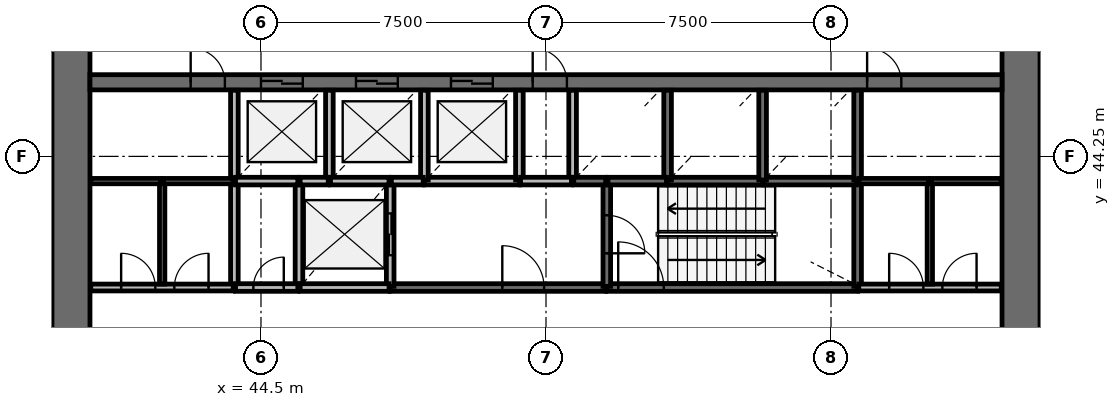
"""IFC4 building model, lengths in metres.
Left out: names, types, materials, properties, quantities, classifications, styles, units other than length and angle.
Written with IfcOpenShell. Run it as: python <this file> out.ifc"""

import sys

from ifc_helpers import new_model, si_unit, direction, frame, frame_2d, origin, place, context, subcontext, project, spatial, rectangle, extrude, source, transform, mapped, element, fill, save


model = new_model("IFC4")
c1 = context("Model", 3, precision=1e-05, world=origin(), true_north=direction((0.0, 1.0)))
c2 = subcontext(c1, "Body", "Model", "MODEL_VIEW")
j1 = project(units=[si_unit("LENGTHUNIT", "METRE"), si_unit("PLANEANGLEUNIT", "RADIAN")], contexts=[c1])
p1 = place(None, origin())
s1 = spatial("IfcSite", under=j1, at=p1, CompositionType="ELEMENT")
p2 = place(p1, origin())
s2 = spatial("IfcBuilding", under=s1, at=p2, CompositionType="ELEMENT")
p3 = place(p2, frame((0.0, 0.0, 35.8)))
s3 = spatial("IfcBuildingStorey", under=s2, at=p3, CompositionType="ELEMENT", Elevation=35.8)
p4 = place(p3, frame((64.5, 38.0, 0.0), z_axis=(0.0, 0.0, 1.0), x_axis=(0.0, 1.0, 0.0)))
e1 = element("IfcWall", 1, at=p4, inside=s3, PredefinedType="SHEAR", context=c2, shape_type="SweptSolid", body=[
    extrude(rectangle(XDim=20.0, YDim=1.0, at=frame_2d((10.0, 0.0))), origin(), (0.0, 0.0, 1.0), 4.4),
])
p5 = place(p4, frame((9.1, 0.0, 0.0)))
e2 = element("IfcOpeningElement", 2, at=p5, cuts=e1, PredefinedType="OPENING", context=c2, shape_type="SweptSolid", body=[
    extrude(rectangle(XDim=1.8, YDim=2.1, at=frame_2d((0.9, 1.05))), frame((0.0, 0.51, 0.0), z_axis=(0.0, -1.0, 0.0), x_axis=(1.0, 0.0, 0.0)), (0.0, 0.0, 1.0), 1.02),
])
p6 = place(p3, frame((39.5, 58.0, 0.0), z_axis=(0.0, 0.0, 1.0), x_axis=(0.0, -1.0, 0.0)))
e3 = element("IfcWall", 3, at=p6, inside=s3, PredefinedType="SHEAR", context=c2, shape_type="SweptSolid", body=[
    extrude(rectangle(XDim=20.0, YDim=1.0, at=frame_2d((10.0, 0.0))), origin(), (0.0, 0.0, 1.0), 4.4),
])
p7 = place(p6, frame((9.1, 0.0, 0.0)))
e4 = element("IfcOpeningElement", 4, at=p7, cuts=e3, PredefinedType="OPENING", context=c2, shape_type="SweptSolid", body=[
    extrude(rectangle(XDim=1.8, YDim=2.1, at=frame_2d((0.9, 1.05))), frame((0.0, 0.51, 0.0), z_axis=(0.0, -1.0, 0.0), x_axis=(1.0, 0.0, 0.0)), (0.0, 0.0, 1.0), 1.02),
])
p8 = place(p3, frame((40.0, 46.2, 0.0), z_axis=(0.0, 0.0, 1.0), x_axis=(1.0, 0.0, 0.0)))
e5 = element("IfcWall", 5, at=p8, inside=s3, PredefinedType="SHEAR", context=c2, shape_type="SweptSolid", body=[
    extrude(rectangle(XDim=24.0, YDim=0.4, at=frame_2d((12.0, 0.0))), origin(), (0.0, 0.0, 1.0), 4.4),
])
p9 = place(p8, frame((4.5, 0.0, 0.0)))
e6 = element("IfcOpeningElement", 6, at=p9, cuts=e5, PredefinedType="OPENING", context=c2, shape_type="SweptSolid", body=[
    extrude(rectangle(XDim=1.1, YDim=2.1, at=frame_2d((0.55, 1.05))), frame((0.0, 0.21, 0.0), z_axis=(0.0, -1.0, 0.0), x_axis=(1.0, 0.0, 0.0)), (0.0, 0.0, 1.0), 0.42),
])
p10 = place(p8, frame((7.0, 0.0, 0.0)))
e7 = element("IfcOpeningElement", 7, at=p10, cuts=e5, PredefinedType="OPENING", context=c2, shape_type="SweptSolid", body=[
    extrude(rectangle(XDim=1.1, YDim=2.1, at=frame_2d((0.55, 1.05))), frame((0.0, 0.21, 0.0), z_axis=(0.0, -1.0, 0.0), x_axis=(1.0, 0.0, 0.0)), (0.0, 0.0, 1.0), 0.42),
])
p11 = place(p8, frame((9.5, 0.0, 0.0)))
e8 = element("IfcOpeningElement", 8, at=p11, cuts=e5, PredefinedType="OPENING", context=c2, shape_type="SweptSolid", body=[
    extrude(rectangle(XDim=1.1, YDim=2.1, at=frame_2d((0.55, 1.05))), frame((0.0, 0.21, 0.0), z_axis=(0.0, -1.0, 0.0), x_axis=(1.0, 0.0, 0.0)), (0.0, 0.0, 1.0), 0.42),
])
p12 = place(p8, frame((20.45, 0.0, 0.0)))
e9 = element("IfcOpeningElement", 9, at=p12, cuts=e5, PredefinedType="OPENING", context=c2, shape_type="SweptSolid", body=[
    extrude(rectangle(XDim=0.9, YDim=2.1, at=frame_2d((0.45, 1.05))), frame((0.0, 0.21, 0.0), z_axis=(0.0, -1.0, 0.0), x_axis=(1.0, 0.0, 0.0)), (0.0, 0.0, 1.0), 0.42),
])
p13 = place(p8, frame((2.65, 0.0, 0.0)))
e10 = element("IfcOpeningElement", 10, at=p13, cuts=e5, PredefinedType="OPENING", context=c2, shape_type="SweptSolid", body=[
    extrude(rectangle(XDim=0.9, YDim=2.1, at=frame_2d((0.45, 1.05))), frame((0.0, 0.21, 0.0), z_axis=(0.0, -1.0, 0.0), x_axis=(1.0, 0.0, 0.0)), (0.0, 0.0, 1.0), 0.42),
])
p14 = place(p8, frame((11.65, 0.0, 0.0)))
e11 = element("IfcOpeningElement", 11, at=p14, cuts=e5, PredefinedType="OPENING", context=c2, shape_type="SweptSolid", body=[
    extrude(rectangle(XDim=0.9, YDim=2.1, at=frame_2d((0.45, 1.05))), frame((0.0, 0.21, 0.0), z_axis=(0.0, -1.0, 0.0), x_axis=(1.0, 0.0, 0.0)), (0.0, 0.0, 1.0), 0.42),
])
p15 = place(p3, frame((53.6, 40.8, 0.0), z_axis=(0.0, 0.0, 1.0), x_axis=(1.0, 0.0, 0.0)))
e12 = element("IfcWall", 12, at=p15, inside=s3, PredefinedType="SOLIDWALL", context=c2, shape_type="SweptSolid", body=[
    extrude(rectangle(XDim=6.6, YDim=0.2, at=frame_2d((3.3, 0.0))), origin(), (0.0, 0.0, 1.0), 3.95),
])
p16 = place(p15, frame((0.3, 0.0, 0.0)))
e13 = element("IfcOpeningElement", 13, at=p16, cuts=e12, PredefinedType="OPENING", context=c2, shape_type="SweptSolid", body=[
    extrude(rectangle(XDim=1.2, YDim=2.1, at=frame_2d((0.6, 1.05))), frame((0.0, 0.11, 0.0), z_axis=(0.0, -1.0, 0.0), x_axis=(1.0, 0.0, 0.0)), (0.0, 0.0, 1.0), 0.22),
])
p17 = place(p3, frame((47.9, 40.8, 0.0), z_axis=(0.0, 0.0, 1.0), x_axis=(1.0, 0.0, 0.0)))
e14 = element("IfcWall", 14, at=p17, inside=s3, PredefinedType="SOLIDWALL", context=c2, shape_type="SweptSolid", body=[
    extrude(rectangle(XDim=5.67, YDim=0.2, at=frame_2d((2.835, 0.0))), origin(), (0.0, 0.0, 1.0), 3.95),
])
p18 = place(p17, frame((2.95, 0.0, 0.0)))
e15 = element("IfcOpeningElement", 15, at=p18, cuts=e14, PredefinedType="OPENING", context=c2, shape_type="SweptSolid", body=[
    extrude(rectangle(XDim=1.1, YDim=2.1, at=frame_2d((0.55, 1.05))), frame((0.0, 0.11, 0.0), z_axis=(0.0, -1.0, 0.0), x_axis=(1.0, 0.0, 0.0)), (0.0, 0.0, 1.0), 0.22),
])
for number, where, z_axis, x_axis in (
    (16, (43.8, 43.6, 0.0), (0.0, 0.0, 1.0), (0.0, -1.0, 0.0)),
    (17, (45.5, 43.6, 0.0), (0.0, 0.0, 1.0), (0.0, -1.0, 0.0)),
):
    element("IfcWall", number, at=place(p3, frame(where, z_axis=z_axis, x_axis=x_axis)), inside=s3, PredefinedType="SOLIDWALL", context=c2, shape_type="SweptSolid", body=[
        extrude(rectangle(XDim=2.8, YDim=0.2, at=frame_2d((1.4, 0.0))), origin(), (0.0, 0.0, 1.0), 3.95),
    ])
p19 = place(p3, frame((47.9, 40.83, 0.0), z_axis=(0.0, 0.0, 1.0), x_axis=(0.0, 1.0, 0.0)))
e18 = element("IfcWall", 18, at=p19, inside=s3, PredefinedType="SOLIDWALL", context=c2, shape_type="SweptSolid", body=[
    extrude(rectangle(XDim=2.77, YDim=0.2, at=frame_2d((1.385, 0.0))), origin(), (0.0, 0.0, 1.0), 3.95),
])
p20 = place(p19, frame((0.82, 0.0, 0.0)))
e19 = element("IfcOpeningElement", 19, at=p20, cuts=e18, PredefinedType="OPENING", context=c2, shape_type="SweptSolid", body=[
    extrude(rectangle(XDim=1.1, YDim=2.1, at=frame_2d((0.55, 1.05))), frame((0.0, 0.11, 0.0), z_axis=(0.0, -1.0, 0.0), x_axis=(1.0, 0.0, 0.0)), (0.0, 0.0, 1.0), 0.22),
])
p21 = place(p3, frame((60.2, 40.83, 0.0), z_axis=(0.0, 0.0, 1.0), x_axis=(0.0, 1.0, 0.0)))
e20 = element("IfcWall", 20, at=p21, inside=s3, PredefinedType="SOLIDWALL", context=c2, shape_type="SweptSolid", body=[
    extrude(rectangle(XDim=2.77, YDim=0.2, at=frame_2d((1.385, 0.0))), origin(), (0.0, 0.0, 1.0), 3.95),
])
p22 = place(p3, frame((53.6, 43.6, 0.0), z_axis=(0.0, 0.0, 1.0), x_axis=(0.0, -1.0, 0.0)))
e21 = element("IfcWall", 21, at=p22, inside=s3, PredefinedType="SOLIDWALL", context=c2, shape_type="SweptSolid", body=[
    extrude(rectangle(XDim=2.77, YDim=0.2, at=frame_2d((1.385, 0.0))), origin(), (0.0, 0.0, 1.0), 3.95),
])
p23 = place(p22, frame((0.9, 0.0, 0.0)))
e22 = element("IfcOpeningElement", 22, at=p23, cuts=e21, PredefinedType="OPENING", context=c2, shape_type="SweptSolid", body=[
    extrude(rectangle(XDim=1.0, YDim=2.1, at=frame_2d((0.5, 1.05))), frame((0.0, 0.11, 0.0), z_axis=(0.0, -1.0, 0.0), x_axis=(1.0, 0.0, 0.0)), (0.0, 0.0, 1.0), 0.22),
])
for number, where, z_axis, x_axis in (
    (23, (48.8, 43.6, 0.0), (0.0, 0.0, 1.0), (1.0, 0.0, 0.0)),
    (24, (55.2, 43.6, 0.0), (0.0, 0.0, 1.0), (1.0, 0.0, 0.0)),
):
    element("IfcWall", number, at=place(p3, frame(where, z_axis=z_axis, x_axis=x_axis)), inside=s3, PredefinedType="SOLIDWALL", context=c2, shape_type="SweptSolid", body=[
        extrude(rectangle(XDim=2.5, YDim=0.2, at=frame_2d((1.25, 0.0))), origin(), (0.0, 0.0, 1.0), 3.95),
    ])
p24 = place(p3, frame((57.73, 43.6, 0.0), z_axis=(0.0, 0.0, 1.0), x_axis=(1.0, 0.0, 0.0)))
e25 = element("IfcWall", 25, at=p24, inside=s3, PredefinedType="SOLIDWALL", context=c2, shape_type="SweptSolid", body=[
    extrude(rectangle(XDim=2.44, YDim=0.2, at=frame_2d((1.22, 0.0))), origin(), (0.0, 0.0, 1.0), 3.95),
])
p25 = place(p3, frame((45.53, 40.8, 0.0), z_axis=(0.0, 0.0, 1.0), x_axis=(1.0, 0.0, 0.0)))
e26 = element("IfcWall", 26, at=p25, inside=s3, PredefinedType="SOLIDWALL", context=c2, shape_type="SweptSolid", body=[
    extrude(rectangle(XDim=2.34, YDim=0.2, at=frame_2d((1.17, 0.0))), origin(), (0.0, 0.0, 1.0), 3.95),
])
p26 = place(p3, frame((43.8, 45.99, 0.0), z_axis=(0.0, 0.0, 1.0), x_axis=(0.0, -1.0, 0.0)))
e27 = element("IfcWall", 27, at=p26, inside=s3, PredefinedType="SOLIDWALL", context=c2, shape_type="SweptSolid", body=[
    extrude(rectangle(XDim=2.36, YDim=0.2, at=frame_2d((1.18, 0.0))), origin(), (0.0, 0.0, 1.0), 3.95),
])
p27 = place(p3, frame((46.3, 43.6, 0.0), z_axis=(0.0, 0.0, 1.0), x_axis=(0.0, 1.0, 0.0)))
e28 = element("IfcWall", 28, at=p27, inside=s3, PredefinedType="SOLIDWALL", context=c2, shape_type="SweptSolid", body=[
    extrude(rectangle(XDim=2.39, YDim=0.2, at=frame_2d((1.195, 0.0))), origin(), (0.0, 0.0, 1.0), 3.95),
])
for number, where, z_axis, x_axis in (
    (29, (48.8, 43.63, 0.0), (0.0, 0.0, 1.0), (0.0, 1.0, 0.0)),
    (30, (51.3, 43.63, 0.0), (0.0, 0.0, 1.0), (0.0, 1.0, 0.0)),
):
    element("IfcWall", number, at=place(p3, frame(where, z_axis=z_axis, x_axis=x_axis)), inside=s3, PredefinedType="SOLIDWALL", context=c2, shape_type="SweptSolid", body=[
        extrude(rectangle(XDim=2.36, YDim=0.2, at=frame_2d((1.18, 0.0))), origin(), (0.0, 0.0, 1.0), 3.95),
    ])
p28 = place(p3, frame((52.7, 45.99, 0.0), z_axis=(0.0, 0.0, 1.0), x_axis=(0.0, -1.0, 0.0)))
e31 = element("IfcWall", 31, at=p28, inside=s3, PredefinedType="SOLIDWALL", context=c2, shape_type="SweptSolid", body=[
    extrude(rectangle(XDim=2.39, YDim=0.2, at=frame_2d((1.195, 0.0))), origin(), (0.0, 0.0, 1.0), 3.95),
])
for number, where, z_axis, x_axis in (
    (32, (55.2, 43.63, 0.0), (0.0, 0.0, 1.0), (0.0, 1.0, 0.0)),
    (33, (57.7, 43.63, 0.0), (0.0, 0.0, 1.0), (0.0, 1.0, 0.0)),
    (34, (60.2, 43.63, 0.0), (0.0, 0.0, 1.0), (0.0, 1.0, 0.0)),
):
    element("IfcWall", number, at=place(p3, frame(where, z_axis=z_axis, x_axis=x_axis)), inside=s3, PredefinedType="SOLIDWALL", context=c2, shape_type="SweptSolid", body=[
        extrude(rectangle(XDim=2.36, YDim=0.2, at=frame_2d((1.18, 0.0))), origin(), (0.0, 0.0, 1.0), 3.95),
    ])
p29 = place(p3, frame((43.83, 43.6, 0.0), z_axis=(0.0, 0.0, 1.0), x_axis=(1.0, 0.0, 0.0)))
e35 = element("IfcWall", 35, at=p29, inside=s3, PredefinedType="SOLIDWALL", context=c2, shape_type="SweptSolid", body=[
    extrude(rectangle(XDim=1.64, YDim=0.2, at=frame_2d((0.82, 0.0))), origin(), (0.0, 0.0, 1.0), 3.95),
])
p30 = place(p3, frame((43.83, 40.8, 0.0), z_axis=(0.0, 0.0, 1.0), x_axis=(1.0, 0.0, 0.0)))
e36 = element("IfcWall", 36, at=p30, inside=s3, PredefinedType="SOLIDWALL", context=c2, shape_type="SweptSolid", body=[
    extrude(rectangle(XDim=1.64, YDim=0.2, at=frame_2d((0.82, 0.0))), origin(), (0.0, 0.0, 1.0), 3.95),
])
p31 = place(p30, frame((0.47, 0.0, 0.0)))
e37 = element("IfcOpeningElement", 37, at=p31, cuts=e36, PredefinedType="OPENING", context=c2, shape_type="SweptSolid", body=[
    extrude(rectangle(XDim=0.8, YDim=2.1, at=frame_2d((0.4, 1.05))), frame((0.0, 0.11, 0.0), z_axis=(0.0, -1.0, 0.0), x_axis=(1.0, 0.0, 0.0)), (0.0, 0.0, 1.0), 0.22),
])
for number, where, z_axis, x_axis in (
    (38, (46.33, 43.6, 0.0), (0.0, 0.0, 1.0), (1.0, 0.0, 0.0)),
    (39, (53.63, 43.6, 0.0), (0.0, 0.0, 1.0), (1.0, 0.0, 0.0)),
):
    element("IfcWall", number, at=place(p3, frame(where, z_axis=z_axis, x_axis=x_axis)), inside=s3, PredefinedType="SOLIDWALL", context=c2, shape_type="SweptSolid", body=[
        extrude(rectangle(XDim=1.54, YDim=0.2, at=frame_2d((0.77, 0.0))), origin(), (0.0, 0.0, 1.0), 3.95),
    ])
p32 = place(p3, frame((52.67, 43.6, 0.0), z_axis=(0.0, 0.0, 1.0), x_axis=(-1.0, 0.0, 0.0)))
e40 = element("IfcWall", 40, at=p32, inside=s3, PredefinedType="SOLIDWALL", context=c2, shape_type="SweptSolid", body=[
    extrude(rectangle(XDim=1.34, YDim=0.2, at=frame_2d((0.67, 0.0))), origin(), (0.0, 0.0, 1.0), 3.95),
])
for number, where, z_axis, x_axis in (
    (41, (47.93, 43.6, 0.0), (0.0, 0.0, 1.0), (1.0, 0.0, 0.0)),
    (42, (52.73, 43.6, 0.0), (0.0, 0.0, 1.0), (1.0, 0.0, 0.0)),
):
    element("IfcWall", number, at=place(p3, frame(where, z_axis=z_axis, x_axis=x_axis)), inside=s3, PredefinedType="SOLIDWALL", context=c2, shape_type="SweptSolid", body=[
        extrude(rectangle(XDim=0.84, YDim=0.2, at=frame_2d((0.42, 0.0))), origin(), (0.0, 0.0, 1.0), 3.95),
    ])
p33 = place(p3, frame((45.53, 43.6, 0.0), z_axis=(0.0, 0.0, 1.0), x_axis=(1.0, 0.0, 0.0)))
e43 = element("IfcWall", 43, at=p33, inside=s3, PredefinedType="SOLIDWALL", context=c2, shape_type="SweptSolid", body=[
    extrude(rectangle(XDim=0.74, YDim=0.2, at=frame_2d((0.37, 0.0))), origin(), (0.0, 0.0, 1.0), 3.95),
])
p34 = place(p3, frame((40.02, 40.8, 0.0), z_axis=(0.0, 0.0, 1.0), x_axis=(1.0, 0.0, 0.0)))
e44 = element("IfcWall", 44, at=p34, inside=s3, PredefinedType="PARTITIONING", context=c2, shape_type="SweptSolid", body=[
    extrude(rectangle(XDim=3.75, YDim=0.18, at=frame_2d((1.875, 0.0))), origin(), (0.0, 0.0, 1.0), 3.95),
])
p35 = place(p34, frame((0.8, 0.0, 0.0)))
e45 = element("IfcOpeningElement", 45, at=p35, cuts=e44, PredefinedType="OPENING", context=c2, shape_type="SweptSolid", body=[
    extrude(rectangle(XDim=0.9, YDim=2.1, at=frame_2d((0.45, 1.05))), frame((0.0, 0.1, 0.0), z_axis=(0.0, -1.0, 0.0), x_axis=(1.0, 0.0, 0.0)), (0.0, 0.0, 1.0), 0.2),
])
p36 = place(p34, frame((2.2, 0.0, 0.0)))
e46 = element("IfcOpeningElement", 46, at=p36, cuts=e44, PredefinedType="OPENING", context=c2, shape_type="SweptSolid", body=[
    extrude(rectangle(XDim=0.9, YDim=2.1, at=frame_2d((0.45, 1.05))), frame((0.0, 0.1, 0.0), z_axis=(0.0, -1.0, 0.0), x_axis=(1.0, 0.0, 0.0)), (0.0, 0.0, 1.0), 0.2),
])
p37 = place(p3, frame((60.23, 40.8, 0.0), z_axis=(0.0, 0.0, 1.0), x_axis=(1.0, 0.0, 0.0)))
e47 = element("IfcWall", 47, at=p37, inside=s3, PredefinedType="PARTITIONING", context=c2, shape_type="SweptSolid", body=[
    extrude(rectangle(XDim=3.75, YDim=0.18, at=frame_2d((1.875, 0.0))), origin(), (0.0, 0.0, 1.0), 3.95),
])
p38 = place(p37, frame((0.8, 0.0, 0.0)))
e48 = element("IfcOpeningElement", 48, at=p38, cuts=e47, PredefinedType="OPENING", context=c2, shape_type="SweptSolid", body=[
    extrude(rectangle(XDim=0.9, YDim=2.1, at=frame_2d((0.45, 1.05))), frame((0.0, 0.1, 0.0), z_axis=(0.0, -1.0, 0.0), x_axis=(1.0, 0.0, 0.0)), (0.0, 0.0, 1.0), 0.2),
])
p39 = place(p37, frame((2.2, 0.0, 0.0)))
e49 = element("IfcOpeningElement", 49, at=p39, cuts=e47, PredefinedType="OPENING", context=c2, shape_type="SweptSolid", body=[
    extrude(rectangle(XDim=0.9, YDim=2.1, at=frame_2d((0.45, 1.05))), frame((0.0, 0.1, 0.0), z_axis=(0.0, -1.0, 0.0), x_axis=(1.0, 0.0, 0.0)), (0.0, 0.0, 1.0), 0.2),
])
for number, where, z_axis, x_axis in (
    (50, (41.9, 40.89, 0.0), (0.0, 0.0, 1.0), (0.0, 1.0, 0.0)),
    (51, (62.1, 40.89, 0.0), (0.0, 0.0, 1.0), (0.0, 1.0, 0.0)),
):
    element("IfcWall", number, at=place(p3, frame(where, z_axis=z_axis, x_axis=x_axis)), inside=s3, PredefinedType="PARTITIONING", context=c2, shape_type="SweptSolid", body=[
        extrude(rectangle(XDim=2.71, YDim=0.14, at=frame_2d((1.355, 0.0))), origin(), (0.0, 0.0, 1.0), 3.05),
    ])
for number, where, z_axis, x_axis in (
    (52, (43.77, 43.6, 0.0), (0.0, 0.0, 1.0), (-1.0, 0.0, 0.0)),
    (53, (60.23, 43.6, 0.0), (0.0, 0.0, 1.0), (1.0, 0.0, 0.0)),
):
    element("IfcWall", number, at=place(p3, frame(where, z_axis=z_axis, x_axis=x_axis)), inside=s3, PredefinedType="PARTITIONING", context=c2, shape_type="SweptSolid", body=[
        extrude(rectangle(XDim=1.84, YDim=0.14, at=frame_2d((0.92, 0.0))), origin(), (0.0, 0.0, 1.0), 3.05),
    ])
for number, where, z_axis, x_axis in (
    (54, (41.87, 43.6, 0.0), (0.0, 0.0, 1.0), (-1.0, 0.0, 0.0)),
    (55, (62.13, 43.6, 0.0), (0.0, 0.0, 1.0), (1.0, 0.0, 0.0)),
):
    element("IfcWall", number, at=place(p3, frame(where, z_axis=z_axis, x_axis=x_axis)), inside=s3, PredefinedType="PARTITIONING", context=c2, shape_type="SweptSolid", body=[
        extrude(rectangle(XDim=1.85, YDim=0.14, at=frame_2d((0.925, 0.0))), origin(), (0.0, 0.0, 1.0), 3.05),
    ])
m1 = source(origin(), c2, "Body", "SweptSolid", [
    extrude(rectangle(XDim=1.1, YDim=2.1, at=frame_2d((0.55, 1.05))), frame((0.0, 0.025, 0.0), z_axis=(0.0, -1.0, 0.0), x_axis=(1.0, 0.0, 0.0)), (0.0, 0.0, 1.0), 0.05),
])
p40 = place(p9, origin())
e56 = element("IfcDoor", 56, at=p40, inside=s3, OperationType="DOUBLE_DOOR_SLIDING", PredefinedType="USERDEFINED", context=c2, shape_type="MappedRepresentation", body=[
    mapped(m1, transform((0.0, 0.0, 0.0), scale=1.0)),
])
fill(e6, e56)
p41 = place(p10, origin())
e57 = element("IfcDoor", 57, at=p41, inside=s3, OperationType="DOUBLE_DOOR_SLIDING", PredefinedType="USERDEFINED", context=c2, shape_type="MappedRepresentation", body=[
    mapped(m1, transform((0.0, 0.0, 0.0), scale=1.0)),
])
fill(e7, e57)
p42 = place(p11, origin())
e58 = element("IfcDoor", 58, at=p42, inside=s3, OperationType="DOUBLE_DOOR_SLIDING", PredefinedType="USERDEFINED", context=c2, shape_type="MappedRepresentation", body=[
    mapped(m1, transform((0.0, 0.0, 0.0), scale=1.0)),
])
fill(e8, e58)
p43 = place(p20, origin())
e59 = element("IfcDoor", 59, at=p43, inside=s3, OperationType="DOUBLE_DOOR_SLIDING", PredefinedType="USERDEFINED", context=c2, shape_type="MappedRepresentation", body=[
    mapped(m1, transform((0.0, 0.0, 0.0), scale=1.0)),
])
fill(e19, e59)
m2 = source(origin(), c2, "Body", "SweptSolid", [
    extrude(rectangle(XDim=1.2, YDim=2.1, at=frame_2d((0.6, 1.05))), frame((0.0, 0.025, 0.0), z_axis=(0.0, -1.0, 0.0), x_axis=(1.0, 0.0, 0.0)), (0.0, 0.0, 1.0), 0.05),
])
p44 = place(p16, origin())
e60 = element("IfcDoor", 60, at=p44, inside=s3, OperationType="SINGLE_SWING_LEFT", PredefinedType="DOOR", context=c2, shape_type="MappedRepresentation", body=[
    mapped(m2, transform((0.0, 0.0, 0.0), scale=1.0)),
])
fill(e13, e60)
m3 = source(origin(), c2, "Body", "SweptSolid", [
    extrude(rectangle(XDim=1.0, YDim=2.1, at=frame_2d((0.5, 1.05))), frame((0.0, 0.025, 0.0), z_axis=(0.0, -1.0, 0.0), x_axis=(1.0, 0.0, 0.0)), (0.0, 0.0, 1.0), 0.05),
])
p45 = place(p23, origin())
e61 = element("IfcDoor", 61, at=p45, inside=s3, OperationType="SINGLE_SWING_RIGHT", PredefinedType="DOOR", context=c2, shape_type="MappedRepresentation", body=[
    mapped(m3, transform((0.0, 0.0, 0.0), scale=1.0)),
])
fill(e22, e61)
m4 = source(origin(), c2, "Body", "SweptSolid", [
    extrude(rectangle(XDim=1.1, YDim=2.1, at=frame_2d((0.55, 1.05))), frame((0.0, 0.025, 0.0), z_axis=(0.0, -1.0, 0.0), x_axis=(1.0, 0.0, 0.0)), (0.0, 0.0, 1.0), 0.05),
])
p46 = place(p18, origin())
e62 = element("IfcDoor", 62, at=p46, inside=s3, OperationType="SINGLE_SWING_LEFT", PredefinedType="DOOR", context=c2, shape_type="MappedRepresentation", body=[
    mapped(m4, transform((0.0, 0.0, 0.0), scale=1.0)),
])
fill(e15, e62)
m5 = source(origin(), c2, "Body", "SweptSolid", [
    extrude(rectangle(XDim=0.8, YDim=2.1, at=frame_2d((0.4, 1.05))), frame((0.0, 0.025, 0.0), z_axis=(0.0, -1.0, 0.0), x_axis=(1.0, 0.0, 0.0)), (0.0, 0.0, 1.0), 0.05),
])
p47 = place(p31, origin())
e63 = element("IfcDoor", 63, at=p47, inside=s3, OperationType="SINGLE_SWING_RIGHT", PredefinedType="DOOR", context=c2, shape_type="MappedRepresentation", body=[
    mapped(m5, transform((0.0, 0.0, 0.0), scale=1.0)),
])
fill(e37, e63)
m6 = source(origin(), c2, "Body", "SweptSolid", [
    extrude(rectangle(XDim=0.9, YDim=2.1, at=frame_2d((0.45, 1.05))), frame((0.0, 0.025, 0.0), z_axis=(0.0, -1.0, 0.0), x_axis=(1.0, 0.0, 0.0)), (0.0, 0.0, 1.0), 0.05),
])
p48 = place(p35, origin())
e64 = element("IfcDoor", 64, at=p48, inside=s3, OperationType="SINGLE_SWING_LEFT", PredefinedType="DOOR", context=c2, shape_type="MappedRepresentation", body=[
    mapped(m6, transform((0.0, 0.0, 0.0), scale=1.0)),
])
fill(e45, e64)
p49 = place(p36, origin())
e65 = element("IfcDoor", 65, at=p49, inside=s3, OperationType="SINGLE_SWING_RIGHT", PredefinedType="DOOR", context=c2, shape_type="MappedRepresentation", body=[
    mapped(m6, transform((0.0, 0.0, 0.0), scale=1.0)),
])
fill(e46, e65)
p50 = place(p12, origin())
e66 = element("IfcDoor", 66, at=p50, inside=s3, OperationType="SINGLE_SWING_LEFT", PredefinedType="DOOR", context=c2, shape_type="MappedRepresentation", body=[
    mapped(m6, transform((0.0, 0.0, 0.0), scale=1.0)),
])
fill(e9, e66)
p51 = place(p38, origin())
e67 = element("IfcDoor", 67, at=p51, inside=s3, OperationType="SINGLE_SWING_LEFT", PredefinedType="DOOR", context=c2, shape_type="MappedRepresentation", body=[
    mapped(m6, transform((0.0, 0.0, 0.0), scale=1.0)),
])
fill(e48, e67)
p52 = place(p39, origin())
e68 = element("IfcDoor", 68, at=p52, inside=s3, OperationType="SINGLE_SWING_RIGHT", PredefinedType="DOOR", context=c2, shape_type="MappedRepresentation", body=[
    mapped(m6, transform((0.0, 0.0, 0.0), scale=1.0)),
])
fill(e49, e68)
p53 = place(p13, origin())
e69 = element("IfcDoor", 69, at=p53, inside=s3, OperationType="SINGLE_SWING_LEFT", PredefinedType="DOOR", context=c2, shape_type="MappedRepresentation", body=[
    mapped(m6, transform((0.0, 0.0, 0.0), scale=1.0)),
])
fill(e10, e69)
p54 = place(p14, origin())
e70 = element("IfcDoor", 70, at=p54, inside=s3, OperationType="SINGLE_SWING_LEFT", PredefinedType="DOOR", context=c2, shape_type="MappedRepresentation", body=[
    mapped(m6, transform((0.0, 0.0, 0.0), scale=1.0)),
])
fill(e11, e70)
save(model, sys.argv[1])
